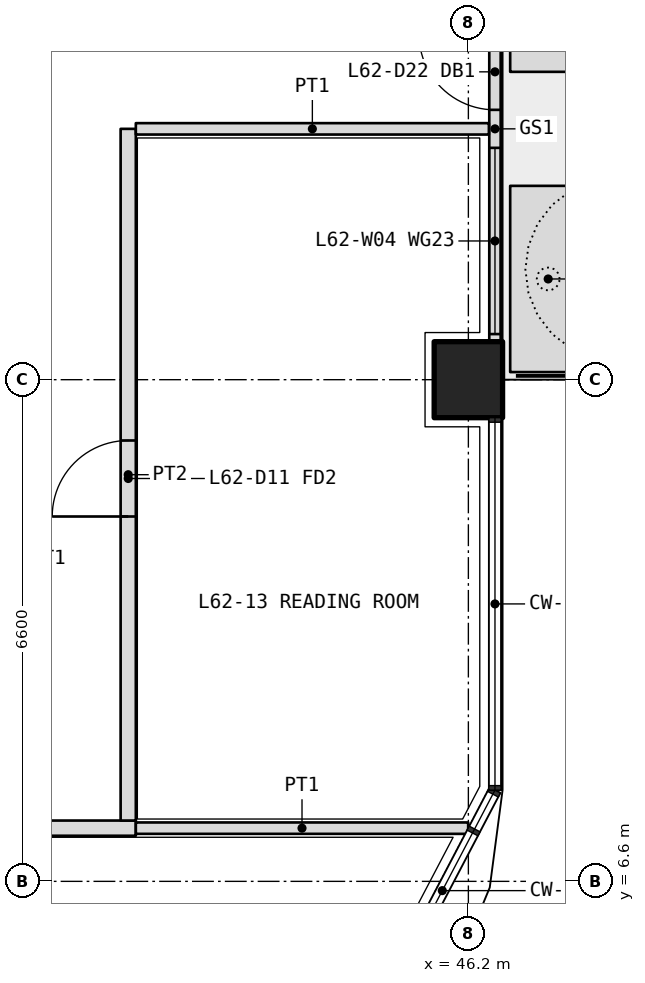
"""IFC4 building model, lengths in metres.
Left out: names, types, materials, properties, quantities, classifications, styles, units other than length and angle.
Written with IfcOpenShell. Run it as: python <this file> out.ifc"""

import sys

from ifc_helpers import new_model, si_unit, direction, frame, frame_2d, origin, origin_2d, place, context, subcontext, project, spatial, polyline, rectangle, outline, extrude, element, fill, save


model = new_model("IFC4")
c1 = context("Model", 3, precision=1e-05, world=origin(), true_north=direction((0.0, 1.0)))
c2 = subcontext(c1, "Body", "Model", "MODEL_VIEW")
j1 = project(units=[si_unit("LENGTHUNIT", "METRE"), si_unit("PLANEANGLEUNIT", "RADIAN")], contexts=[c1])
p1 = place(None, origin())
s1 = spatial("IfcSite", under=j1, at=p1, CompositionType="ELEMENT")
p2 = place(p1, origin())
s2 = spatial("IfcBuilding", under=s1, at=p2, CompositionType="ELEMENT")
p3 = place(p2, frame((0.0, 0.0, 271.2)))
s3 = spatial("IfcBuildingStorey", under=s2, at=p3, CompositionType="ELEMENT", Elevation=271.2)
p4 = place(p3, frame((46.2, 13.2, 0.0), z_axis=(0.0, 0.0, 1.0), x_axis=(0.0, 1.0, 0.0)))
e1 = element("IfcColumn", 1, at=p4, inside=s3, PredefinedType="COLUMN", context=c2, shape_type="SweptSolid", body=[
    extrude(rectangle(XDim=1.0, YDim=0.9, at=origin_2d()), origin(), (0.0, 0.0, 1.0), 4.2),
])
p5 = place(p3, origin())
e2 = element("IfcWall", 2, at=p5, inside=s3, PredefinedType="USERDEFINED", context=c2, shape_type="SweptSolid", body=[
    extrude(outline(polyline([(46.75, 13.3), (47.75, 13.3), (47.75, 15.75), (46.75, 15.75), (46.75, 13.3)]), holes=[polyline([(46.9, 13.45), (47.6, 13.45), (47.6, 15.6), (46.9, 15.6), (46.9, 13.45)])]), origin(), (0.0, 0.0, 1.0), 1.05),
])
p6 = place(p3, origin())
e3 = element("IfcWall", 3, at=p6, inside=s3, PredefinedType="USERDEFINED", context=c2, shape_type="SweptSolid", body=[
    extrude(outline(polyline([(46.75, 17.25), (47.75, 17.25), (47.75, 26.3), (46.75, 26.3), (46.75, 17.25)]), holes=[polyline([(46.9, 17.4), (47.6, 17.4), (47.6, 26.15), (46.9, 26.15), (46.9, 17.4)])]), origin(), (0.0, 0.0, 1.0), 1.05),
])
p7 = place(p3, frame((46.55, 13.7, 0.0), z_axis=(0.0, 0.0, 1.0), x_axis=(0.0, 1.0, 0.0)))
e4 = element("IfcWall", 4, at=p7, inside=s3, PredefinedType="SOLIDWALL", context=c2, shape_type="SweptSolid", body=[
    extrude(rectangle(XDim=5.6, YDim=0.15, at=frame_2d((2.8, 0.0))), origin(), (0.0, 0.0, 1.0), 2.7),
])
p8 = place(p7, frame((3.05, 0.0, 0.0)))
e5 = element("IfcOpeningElement", 5, at=p8, cuts=e4, PredefinedType="OPENING", context=c2, shape_type="SweptSolid", body=[
    extrude(rectangle(XDim=1.0, YDim=2.4, at=frame_2d((0.5, 1.2))), frame((0.0, 0.085, 0.0), z_axis=(0.0, -1.0, 0.0), x_axis=(1.0, 0.0, 0.0)), (0.0, 0.0, 1.0), 0.17),
])
p9 = place(p7, frame((0.1, 0.0, 0.1)))
e6 = element("IfcOpeningElement", 6, at=p9, cuts=e4, PredefinedType="OPENING", context=c2, shape_type="SweptSolid", body=[
    extrude(rectangle(XDim=2.45, YDim=2.3, at=frame_2d((1.225, 1.15))), frame((0.0, 0.085, 0.0), z_axis=(0.0, -1.0, 0.0), x_axis=(1.0, 0.0, 0.0)), (0.0, 0.0, 1.0), 0.17),
])
p10 = place(p7, frame((4.15, 0.0, 0.1)))
e7 = element("IfcOpeningElement", 7, at=p10, cuts=e4, PredefinedType="OPENING", context=c2, shape_type="SweptSolid", body=[
    extrude(rectangle(XDim=1.35, YDim=2.3, at=frame_2d((0.675, 1.15))), frame((0.0, 0.085, 0.0), z_axis=(0.0, -1.0, 0.0), x_axis=(1.0, 0.0, 0.0)), (0.0, 0.0, 1.0), 0.17),
])
p11 = place(p3, frame((10.975, 7.3, 0.0), z_axis=(0.0, 0.0, 1.0), x_axis=(1.0, 0.0, 0.0)))
e8 = element("IfcWall", 8, at=p11, inside=s3, PredefinedType="PARTITIONING", context=c2, shape_type="SweptSolid", body=[
    extrude(rectangle(XDim=30.85, YDim=0.2, at=frame_2d((15.425, 0.0))), origin(), (0.0, 0.0, 1.0), 3.0),
])
p12 = place(p11, frame((7.262, 0.0, 0.0)))
e9 = element("IfcOpeningElement", 9, at=p12, cuts=e8, PredefinedType="OPENING", context=c2, shape_type="SweptSolid", body=[
    extrude(rectangle(XDim=1.0, YDim=2.1, at=frame_2d((0.5, 1.05))), frame((0.0, 0.11, 0.0), z_axis=(0.0, -1.0, 0.0), x_axis=(1.0, 0.0, 0.0)), (0.0, 0.0, 1.0), 0.22),
])
p13 = place(p11, frame((17.025, 0.0, 0.0)))
e10 = element("IfcOpeningElement", 10, at=p13, cuts=e8, PredefinedType="OPENING", context=c2, shape_type="SweptSolid", body=[
    extrude(rectangle(XDim=1.0, YDim=2.1, at=frame_2d((0.5, 1.05))), frame((0.0, 0.11, 0.0), z_axis=(0.0, -1.0, 0.0), x_axis=(1.0, 0.0, 0.0)), (0.0, 0.0, 1.0), 0.22),
])
p14 = place(p11, frame((20.325, 0.0, 0.0)))
e11 = element("IfcOpeningElement", 11, at=p14, cuts=e8, PredefinedType="OPENING", context=c2, shape_type="SweptSolid", body=[
    extrude(rectangle(XDim=1.0, YDim=2.1, at=frame_2d((0.5, 1.05))), frame((0.0, 0.11, 0.0), z_axis=(0.0, -1.0, 0.0), x_axis=(1.0, 0.0, 0.0)), (0.0, 0.0, 1.0), 0.22),
])
p15 = place(p11, frame((25.887, 0.0, 0.0)))
e12 = element("IfcOpeningElement", 12, at=p15, cuts=e8, PredefinedType="OPENING", context=c2, shape_type="SweptSolid", body=[
    extrude(rectangle(XDim=1.0, YDim=2.1, at=frame_2d((0.5, 1.05))), frame((0.0, 0.11, 0.0), z_axis=(0.0, -1.0, 0.0), x_axis=(1.0, 0.0, 0.0)), (0.0, 0.0, 1.0), 0.22),
])
p16 = place(p3, frame((41.725, 7.4, 0.0), z_axis=(0.0, 0.0, 1.0), x_axis=(0.0, 1.0, 0.0)))
e13 = element("IfcWall", 13, at=p16, inside=s3, PredefinedType="PARTITIONING", context=c2, shape_type="SweptSolid", body=[
    extrude(rectangle(XDim=9.1, YDim=0.2, at=frame_2d((4.55, 0.0))), origin(), (0.0, 0.0, 1.0), 3.0),
])
p17 = place(p16, frame((4.0, 0.0, 0.0)))
e14 = element("IfcOpeningElement", 14, at=p17, cuts=e13, PredefinedType="OPENING", context=c2, shape_type="SweptSolid", body=[
    extrude(rectangle(XDim=1.0, YDim=2.1, at=frame_2d((0.5, 1.05))), frame((0.0, 0.11, 0.0), z_axis=(0.0, -1.0, 0.0), x_axis=(1.0, 0.0, 0.0)), (0.0, 0.0, 1.0), 0.22),
])
p18 = place(p3, frame((46.198, 7.3, 0.0), z_axis=(0.0, 0.0, 1.0), x_axis=(-1.0, 0.0, 0.0)))
e15 = element("IfcWall", 15, at=p18, inside=s3, PredefinedType="PARTITIONING", context=c2, shape_type="SweptSolid", body=[
    extrude(rectangle(XDim=4.373, YDim=0.15, at=frame_2d((2.186, 0.0))), origin(), (0.0, 0.0, 1.0), 2.7),
])
p19 = place(p3, frame((46.47, 16.5, 0.0), z_axis=(0.0, 0.0, 1.0), x_axis=(-1.0, 0.0, 0.0)))
e16 = element("IfcWall", 16, at=p19, inside=s3, PredefinedType="PARTITIONING", context=c2, shape_type="SweptSolid", body=[
    extrude(rectangle(XDim=4.645, YDim=0.15, at=frame_2d((2.323, 0.0))), origin(), (0.0, 0.0, 1.0), 2.7),
])
p20 = place(p8, origin())
e17 = element("IfcDoor", 17, at=p20, inside=s3, OperationType="SINGLE_SWING_RIGHT", PredefinedType="DOOR", context=c2, shape_type="SweptSolid", body=[
    extrude(rectangle(XDim=1.0, YDim=2.4, at=frame_2d((0.5, 1.2))), frame((0.0, 0.025, 0.0), z_axis=(0.0, -1.0, 0.0), x_axis=(1.0, 0.0, 0.0)), (0.0, 0.0, 1.0), 0.05),
])
fill(e5, e17)
p21 = place(p9, origin())
e18 = element("IfcWindow", 18, at=p21, inside=s3, PartitioningType="SINGLE_PANEL", PredefinedType="WINDOW", context=c2, shape_type="SweptSolid", body=[
    extrude(rectangle(XDim=2.45, YDim=2.3, at=frame_2d((1.225, 1.15))), frame((0.0, 0.03, 0.0), z_axis=(0.0, -1.0, 0.0), x_axis=(1.0, 0.0, 0.0)), (0.0, 0.0, 1.0), 0.06),
])
fill(e6, e18)
p22 = place(p17, origin())
e19 = element("IfcDoor", 19, at=p22, inside=s3, OperationType="SINGLE_SWING_LEFT", PredefinedType="DOOR", context=c2, shape_type="SweptSolid", body=[
    extrude(rectangle(XDim=1.0, YDim=2.1, at=frame_2d((0.5, 1.05))), frame((0.0, 0.025, 0.0), z_axis=(0.0, -1.0, 0.0), x_axis=(1.0, 0.0, 0.0)), (0.0, 0.0, 1.0), 0.05),
])
fill(e14, e19)
save(model, sys.argv[1])
